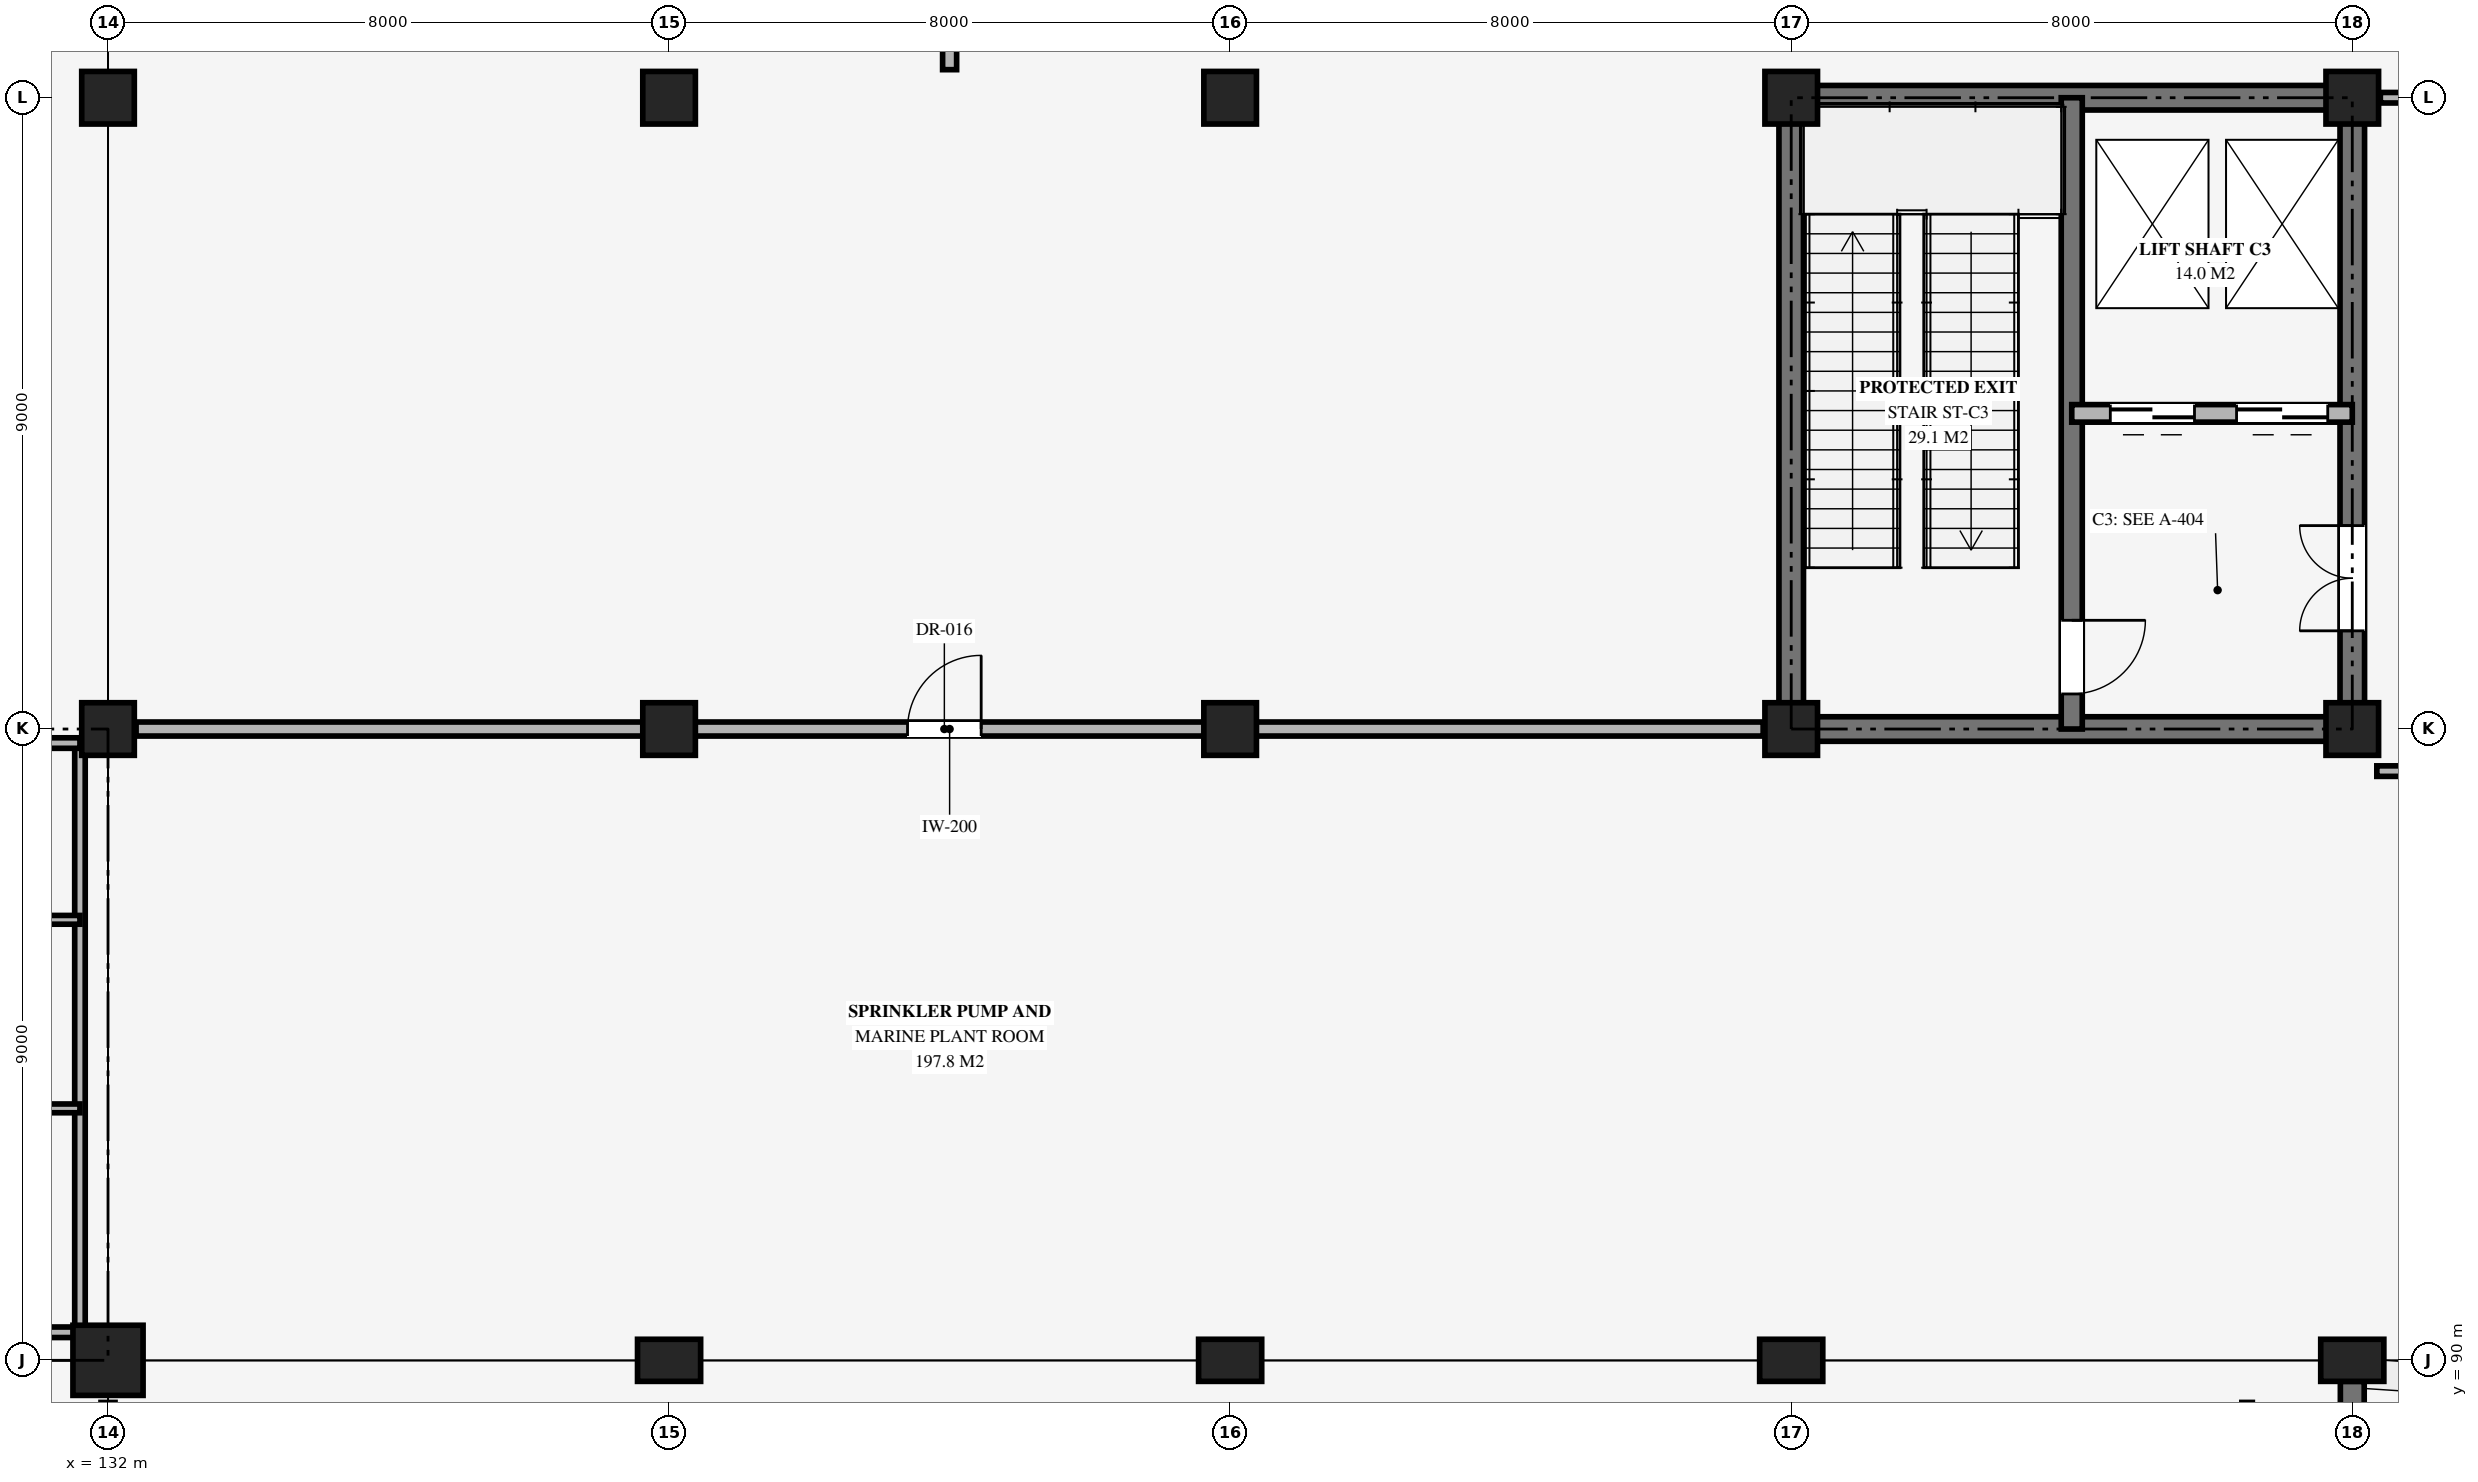
"""IFC4 building model, lengths in metres.
Left out: names, types, materials, properties, quantities, classifications, styles, units other than length and angle.
Written with IfcOpenShell. Run it as: python <this file> out.ifc"""

import sys

from ifc_helpers import new_model, si_unit, direction, frame, frame_2d, origin, origin_2d, place, context, subcontext, project, spatial, rectangle, extrude, element, fill, save


model = new_model("IFC4")
c1 = context("Model", 3, precision=1e-05, world=origin(), true_north=direction((0.0, 1.0)))
c2 = subcontext(c1, "Body", "Model", "MODEL_VIEW")
j1 = project(units=[si_unit("LENGTHUNIT", "METRE"), si_unit("PLANEANGLEUNIT", "RADIAN")], contexts=[c1])
p1 = place(None, origin())
s1 = spatial("IfcSite", under=j1, at=p1, CompositionType="ELEMENT")
p2 = place(p1, origin())
s2 = spatial("IfcBuilding", under=s1, at=p2, CompositionType="ELEMENT")
p3 = place(p2, origin())
s3 = spatial("IfcBuildingStorey", under=s2, at=p3, CompositionType="ELEMENT", Elevation=0.0)
p4 = place(p3, frame((132.0, 90.0, 0.0), z_axis=(0.0, 0.0, 1.0), x_axis=(1.0, 0.0, 0.0)))
e1 = element("IfcColumn", 1, at=p4, inside=s3, PredefinedType="COLUMN", context=c2, shape_type="SweptSolid", body=[
    extrude(rectangle(XDim=1.0, YDim=1.0, at=origin_2d()), origin(), (0.0, 0.0, 1.0), 5.24),
])
for number, where, z_axis, x_axis in (
    (2, (132.0, 99.0, 0.0), (0.0, 0.0, 1.0), (1.0, 0.0, 0.0)),
    (3, (132.0, 108.0, 0.0), (0.0, 0.0, 1.0), (1.0, 0.0, 0.0)),
):
    element("IfcColumn", number, at=place(p3, frame(where, z_axis=z_axis, x_axis=x_axis)), inside=s3, PredefinedType="COLUMN", context=c2, shape_type="SweptSolid", body=[
        extrude(rectangle(XDim=0.75, YDim=0.75, at=origin_2d()), origin(), (0.0, 0.0, 1.0), 5.24),
    ])
p5 = place(p3, frame((140.0, 90.0, 0.0), z_axis=(0.0, 0.0, 1.0), x_axis=(0.0, 1.0, 0.0)))
e4 = element("IfcColumn", 4, at=p5, inside=s3, PredefinedType="PILASTER", context=c2, shape_type="SweptSolid", body=[
    extrude(rectangle(XDim=0.6, YDim=0.9, at=origin_2d()), origin(), (0.0, 0.0, 1.0), 5.24),
])
for number, where, z_axis, x_axis in (
    (5, (140.0, 99.0, 0.0), (0.0, 0.0, 1.0), (1.0, 0.0, 0.0)),
    (6, (140.0, 108.0, 0.0), (0.0, 0.0, 1.0), (1.0, 0.0, 0.0)),
):
    element("IfcColumn", number, at=place(p3, frame(where, z_axis=z_axis, x_axis=x_axis)), inside=s3, PredefinedType="COLUMN", context=c2, shape_type="SweptSolid", body=[
        extrude(rectangle(XDim=0.75, YDim=0.75, at=origin_2d()), origin(), (0.0, 0.0, 1.0), 5.24),
    ])
p6 = place(p3, frame((148.0, 90.0, 0.0), z_axis=(0.0, 0.0, 1.0), x_axis=(0.0, 1.0, 0.0)))
e7 = element("IfcColumn", 7, at=p6, inside=s3, PredefinedType="PILASTER", context=c2, shape_type="SweptSolid", body=[
    extrude(rectangle(XDim=0.6, YDim=0.9, at=origin_2d()), origin(), (0.0, 0.0, 1.0), 5.24),
])
for number, where, z_axis, x_axis in (
    (8, (148.0, 99.0, 0.0), (0.0, 0.0, 1.0), (1.0, 0.0, 0.0)),
    (9, (148.0, 108.0, 0.0), (0.0, 0.0, 1.0), (1.0, 0.0, 0.0)),
):
    element("IfcColumn", number, at=place(p3, frame(where, z_axis=z_axis, x_axis=x_axis)), inside=s3, PredefinedType="COLUMN", context=c2, shape_type="SweptSolid", body=[
        extrude(rectangle(XDim=0.75, YDim=0.75, at=origin_2d()), origin(), (0.0, 0.0, 1.0), 5.24),
    ])
p7 = place(p3, frame((156.0, 90.0, 0.0), z_axis=(0.0, 0.0, 1.0), x_axis=(0.0, 1.0, 0.0)))
e10 = element("IfcColumn", 10, at=p7, inside=s3, PredefinedType="PILASTER", context=c2, shape_type="SweptSolid", body=[
    extrude(rectangle(XDim=0.6, YDim=0.9, at=origin_2d()), origin(), (0.0, 0.0, 1.0), 5.24),
])
for number, where, z_axis, x_axis in (
    (11, (156.0, 99.0, 0.0), (0.0, 0.0, 1.0), (1.0, 0.0, 0.0)),
    (12, (156.0, 108.0, 0.0), (0.0, 0.0, 1.0), (1.0, 0.0, 0.0)),
):
    element("IfcColumn", number, at=place(p3, frame(where, z_axis=z_axis, x_axis=x_axis)), inside=s3, PredefinedType="COLUMN", context=c2, shape_type="SweptSolid", body=[
        extrude(rectangle(XDim=0.75, YDim=0.75, at=origin_2d()), origin(), (0.0, 0.0, 1.0), 5.24),
    ])
p8 = place(p3, frame((164.0, 90.0, 0.0), z_axis=(0.0, 0.0, 1.0), x_axis=(0.0, 1.0, 0.0)))
e13 = element("IfcColumn", 13, at=p8, inside=s3, PredefinedType="PILASTER", context=c2, shape_type="SweptSolid", body=[
    extrude(rectangle(XDim=0.6, YDim=0.9, at=origin_2d()), origin(), (0.0, 0.0, 1.0), 5.24),
])
for number, where, z_axis, x_axis in (
    (14, (164.0, 99.0, 0.0), (0.0, 0.0, 1.0), (1.0, 0.0, 0.0)),
    (15, (164.0, 108.0, 0.0), (0.0, 0.0, 1.0), (1.0, 0.0, 0.0)),
):
    element("IfcColumn", number, at=place(p3, frame(where, z_axis=z_axis, x_axis=x_axis)), inside=s3, PredefinedType="COLUMN", context=c2, shape_type="SweptSolid", body=[
        extrude(rectangle(XDim=0.75, YDim=0.75, at=origin_2d()), origin(), (0.0, 0.0, 1.0), 5.24),
    ])
p9 = place(p3, frame((164.0, 88.65, 0.0), z_axis=(0.0, 0.0, 1.0), x_axis=(0.0, 1.0, 0.0)))
e16 = element("IfcWall", 16, at=p9, inside=s3, PredefinedType="SOLIDWALL", context=c2, shape_type="SweptSolid", body=[
    extrude(rectangle(XDim=1.05, YDim=0.34, at=frame_2d((0.525, 0.0))), origin(), (0.0, 0.0, 1.0), 5.06),
])
for number, where, z_axis, x_axis in (
    (17, (156.0, 99.0, 0.0), (0.0, 0.0, 1.0), (1.0, 0.0, 0.0)),
    (18, (156.0, 108.0, 0.0), (0.0, 0.0, 1.0), (1.0, 0.0, 0.0)),
):
    element("IfcWall", number, at=place(p3, frame(where, z_axis=z_axis, x_axis=x_axis)), inside=s3, PredefinedType="SHEAR", context=c2, shape_type="SweptSolid", body=[
        extrude(rectangle(XDim=8.0, YDim=0.35, at=frame_2d((4.0, 0.0))), origin(), (0.0, 0.0, 1.0), 5.38),
    ])
p10 = place(p3, frame((156.0, 99.0, 0.0), z_axis=(0.0, 0.0, 1.0), x_axis=(0.0, 1.0, 0.0)))
e19 = element("IfcWall", 19, at=p10, inside=s3, PredefinedType="SHEAR", context=c2, shape_type="SweptSolid", body=[
    extrude(rectangle(XDim=9.0, YDim=0.35, at=frame_2d((4.5, 0.0))), origin(), (0.0, 0.0, 1.0), 5.38),
])
p11 = place(p3, frame((164.0, 99.0, 0.0), z_axis=(0.0, 0.0, 1.0), x_axis=(0.0, 1.0, 0.0)))
e20 = element("IfcWall", 20, at=p11, inside=s3, PredefinedType="SHEAR", context=c2, shape_type="SweptSolid", body=[
    extrude(rectangle(XDim=9.0, YDim=0.35, at=frame_2d((4.5, 0.0))), origin(), (0.0, 0.0, 1.0), 5.38),
])
p12 = place(p11, frame((1.4, 0.0, 0.0)))
e21 = element("IfcOpeningElement", 21, at=p12, cuts=e20, PredefinedType="OPENING", context=c2, shape_type="SweptSolid", body=[
    extrude(rectangle(XDim=1.5, YDim=2.2, at=frame_2d((0.75, 1.1))), frame((0.0, 0.185, 0.0), z_axis=(0.0, -1.0, 0.0), x_axis=(1.0, 0.0, 0.0)), (0.0, 0.0, 1.0), 0.37),
])
p13 = place(p3, frame((160.0, 108.0, 0.0), z_axis=(0.0, 0.0, 1.0), x_axis=(0.0, -1.0, 0.0)))
e22 = element("IfcWall", 22, at=p13, inside=s3, PredefinedType="SHEAR", context=c2, shape_type="SweptSolid", body=[
    extrude(rectangle(XDim=9.0, YDim=0.3, at=frame_2d((4.5, 0.0))), origin(), (0.0, 0.0, 1.0), 5.38),
])
p14 = place(p13, frame((7.45, 0.0, 0.0)))
e23 = element("IfcOpeningElement", 23, at=p14, cuts=e22, PredefinedType="OPENING", context=c2, shape_type="SweptSolid", body=[
    extrude(rectangle(XDim=1.05, YDim=2.15, at=frame_2d((0.525, 1.075))), frame((0.0, 0.16, 0.0), z_axis=(0.0, -1.0, 0.0), x_axis=(1.0, 0.0, 0.0)), (0.0, 0.0, 1.0), 0.32),
])
p15 = place(p3, frame((164.0, 103.5, 0.0), z_axis=(0.0, 0.0, 1.0), x_axis=(-1.0, 0.0, 0.0)))
e24 = element("IfcWall", 24, at=p15, inside=s3, PredefinedType="SOLIDWALL", context=c2, shape_type="SweptSolid", body=[
    extrude(rectangle(XDim=4.0, YDim=0.25, at=frame_2d((2.0, 0.0))), origin(), (0.0, 0.0, 1.0), 4.2),
])
p16 = place(p15, frame((0.35, 0.0, 0.0)))
e25 = element("IfcOpeningElement", 25, at=p16, cuts=e24, PredefinedType="OPENING", context=c2, shape_type="SweptSolid", body=[
    extrude(rectangle(XDim=1.3, YDim=2.25, at=frame_2d((0.65, 1.125))), frame((0.0, 0.135, 0.0), z_axis=(0.0, -1.0, 0.0), x_axis=(1.0, 0.0, 0.0)), (0.0, 0.0, 1.0), 0.27),
])
p17 = place(p15, frame((2.25, 0.0, 0.0)))
e26 = element("IfcOpeningElement", 26, at=p17, cuts=e24, PredefinedType="OPENING", context=c2, shape_type="SweptSolid", body=[
    extrude(rectangle(XDim=1.2, YDim=2.2, at=frame_2d((0.6, 1.1))), frame((0.0, 0.135, 0.0), z_axis=(0.0, -1.0, 0.0), x_axis=(1.0, 0.0, 0.0)), (0.0, 0.0, 1.0), 0.27),
])
p18 = place(p3, frame((131.6, 90.4, 0.0), z_axis=(0.0, 0.0, 1.0), x_axis=(0.0, 1.0, 0.0)))
e27 = element("IfcWall", 27, at=p18, inside=s3, PredefinedType="PARTITIONING", context=c2, shape_type="SweptSolid", body=[
    extrude(rectangle(XDim=8.4, YDim=0.15, at=frame_2d((4.2, 0.0))), origin(), (0.0, 0.0, 1.0), 4.2),
])
for number, where, z_axis, x_axis in (
    (28, (122.6, 98.8, 0.0), (0.0, 0.0, 1.0), (1.0, 0.0, 0.0)),
    (29, (122.6, 90.4, 0.0), (0.0, 0.0, 1.0), (1.0, 0.0, 0.0)),
):
    element("IfcWall", number, at=place(p3, frame(where, z_axis=z_axis, x_axis=x_axis)), inside=s3, PredefinedType="PARTITIONING", context=c2, shape_type="SweptSolid", body=[
        extrude(rectangle(XDim=9.0, YDim=0.15, at=frame_2d((4.5, 0.0))), origin(), (0.0, 0.0, 1.0), 4.2),
    ])
for number, where, z_axis, x_axis in (
    (30, (122.6, 93.592, 0.0), (0.0, 0.0, 1.0), (1.0, 0.0, 0.0)),
    (31, (122.6, 96.28, 0.0), (0.0, 0.0, 1.0), (1.0, 0.0, 0.0)),
):
    element("IfcWall", number, at=place(p3, frame(where, z_axis=z_axis, x_axis=x_axis)), inside=s3, PredefinedType="PARTITIONING", context=c2, shape_type="SweptSolid", body=[
        extrude(rectangle(XDim=9.0, YDim=0.125, at=frame_2d((4.5, 0.0))), origin(), (0.0, 0.0, 1.0), 4.2),
    ])
p19 = place(p3, frame((144.0, 108.4, 0.0), z_axis=(0.0, 0.0, 1.0), x_axis=(0.0, 1.0, 0.0)))
e32 = element("IfcWall", 32, at=p19, inside=s3, PredefinedType="SOLIDWALL", context=c2, shape_type="SweptSolid", body=[
    extrude(rectangle(XDim=17.0, YDim=0.2, at=frame_2d((8.5, 0.0))), origin(), (0.0, 0.0, 1.0), 4.2),
])
p20 = place(p19, frame((6.5, 0.0, 0.0)))
e33 = element("IfcOpeningElement", 33, at=p20, cuts=e32, PredefinedType="OPENING", context=c2, shape_type="SweptSolid", body=[
    extrude(rectangle(XDim=1.4, YDim=2.15, at=frame_2d((0.7, 1.075))), frame((0.0, 0.11, 0.0), z_axis=(0.0, -1.0, 0.0), x_axis=(1.0, 0.0, 0.0)), (0.0, 0.0, 1.0), 0.22),
])
p21 = place(p3, frame((132.4, 99.0, 0.0), z_axis=(0.0, 0.0, 1.0), x_axis=(1.0, 0.0, 0.0)))
e34 = element("IfcWall", 34, at=p21, inside=s3, PredefinedType="SOLIDWALL", context=c2, shape_type="SweptSolid", body=[
    extrude(rectangle(XDim=23.2, YDim=0.2, at=frame_2d((11.6, 0.0))), origin(), (0.0, 0.0, 1.0), 4.2),
])
p22 = place(p21, frame((11.0, 0.0, 0.0)))
e35 = element("IfcOpeningElement", 35, at=p22, cuts=e34, PredefinedType="OPENING", context=c2, shape_type="SweptSolid", body=[
    extrude(rectangle(XDim=1.05, YDim=2.15, at=frame_2d((0.525, 1.075))), frame((0.0, 0.11, 0.0), z_axis=(0.0, -1.0, 0.0), x_axis=(1.0, 0.0, 0.0)), (0.0, 0.0, 1.0), 0.22),
])
p23 = place(p3, frame((164.4, 108.0, 0.0), z_axis=(0.0, 0.0, 1.0), x_axis=(1.0, 0.0, 0.0)))
e36 = element("IfcWall", 36, at=p23, inside=s3, PredefinedType="PARTITIONING", context=c2, shape_type="SweptSolid", body=[
    extrude(rectangle(XDim=15.0, YDim=0.15, at=frame_2d((7.5, 0.0))), origin(), (0.0, 0.0, 1.0), 4.2),
])
p24 = place(p23, frame((4.9, 0.0, 0.0)))
e37 = element("IfcOpeningElement", 37, at=p24, cuts=e36, PredefinedType="OPENING", context=c2, shape_type="SweptSolid", body=[
    extrude(rectangle(XDim=1.0, YDim=2.15, at=frame_2d((0.5, 1.075))), frame((0.0, 0.085, 0.0), z_axis=(0.0, -1.0, 0.0), x_axis=(1.0, 0.0, 0.0)), (0.0, 0.0, 1.0), 0.17),
])
p25 = place(p3, frame((164.35, 98.4, 0.0), z_axis=(0.0, 0.0, 1.0), x_axis=(1.0, 0.0, 0.0)))
e38 = element("IfcWall", 38, at=p25, inside=s3, PredefinedType="PARTITIONING", context=c2, shape_type="SweptSolid", body=[
    extrude(rectangle(XDim=15.35, YDim=0.15, at=frame_2d((7.675, 0.0))), origin(), (0.0, 0.0, 1.0), 4.2),
])
p26 = place(p25, frame((3.5, 0.0, 0.0)))
e39 = element("IfcOpeningElement", 39, at=p26, cuts=e38, PredefinedType="OPENING", context=c2, shape_type="SweptSolid", body=[
    extrude(rectangle(XDim=1.05, YDim=2.15, at=frame_2d((0.525, 1.075))), frame((0.0, 0.085, 0.0), z_axis=(0.0, -1.0, 0.0), x_axis=(1.0, 0.0, 0.0)), (0.0, 0.0, 1.0), 0.17),
])
p27 = place(p16, origin())
e40 = element("IfcDoor", 40, at=p27, inside=s3, OperationType="DOUBLE_DOOR_SLIDING", PredefinedType="USERDEFINED", context=c2, shape_type="SweptSolid", body=[
    extrude(rectangle(XDim=1.3, YDim=2.25, at=frame_2d((0.65, 1.125))), frame((0.0, 0.025, 0.0), z_axis=(0.0, -1.0, 0.0), x_axis=(1.0, 0.0, 0.0)), (0.0, 0.0, 1.0), 0.05),
])
fill(e25, e40)
p28 = place(p17, origin())
e41 = element("IfcDoor", 41, at=p28, inside=s3, OperationType="DOUBLE_DOOR_SLIDING", PredefinedType="USERDEFINED", context=c2, shape_type="SweptSolid", body=[
    extrude(rectangle(XDim=1.2, YDim=2.2, at=frame_2d((0.6, 1.1))), frame((0.0, 0.025, 0.0), z_axis=(0.0, -1.0, 0.0), x_axis=(1.0, 0.0, 0.0)), (0.0, 0.0, 1.0), 0.05),
])
fill(e26, e41)
p29 = place(p14, origin())
e42 = element("IfcDoor", 42, at=p29, inside=s3, OperationType="SINGLE_SWING_LEFT", PredefinedType="DOOR", context=c2, shape_type="SweptSolid", body=[
    extrude(rectangle(XDim=1.05, YDim=2.15, at=frame_2d((0.525, 1.075))), frame((0.0, 0.025, 0.0), z_axis=(0.0, -1.0, 0.0), x_axis=(1.0, 0.0, 0.0)), (0.0, 0.0, 1.0), 0.05),
])
fill(e23, e42)
p30 = place(p12, origin())
e43 = element("IfcDoor", 43, at=p30, inside=s3, OperationType="DOUBLE_DOOR_SINGLE_SWING", PredefinedType="DOOR", context=c2, shape_type="SweptSolid", body=[
    extrude(rectangle(XDim=1.5, YDim=2.2, at=frame_2d((0.75, 1.1))), frame((0.0, 0.025, 0.0), z_axis=(0.0, -1.0, 0.0), x_axis=(1.0, 0.0, 0.0)), (0.0, 0.0, 1.0), 0.05),
])
fill(e21, e43)
p31 = place(p22, origin())
e44 = element("IfcDoor", 44, at=p31, inside=s3, OperationType="SINGLE_SWING_RIGHT", PredefinedType="DOOR", context=c2, shape_type="SweptSolid", body=[
    extrude(rectangle(XDim=1.05, YDim=2.15, at=frame_2d((0.525, 1.075))), frame((0.0, 0.025, 0.0), z_axis=(0.0, -1.0, 0.0), x_axis=(1.0, 0.0, 0.0)), (0.0, 0.0, 1.0), 0.05),
])
fill(e35, e44)
save(model, sys.argv[1])
